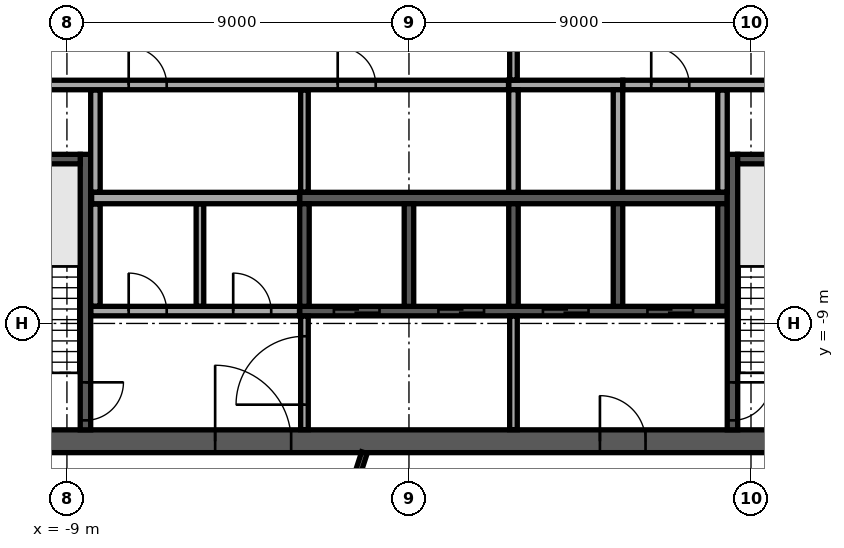
"""IFC4 building model, lengths in metres.
Left out: names, types, materials, properties, quantities, classifications, styles, units other than length and angle.
Written with IfcOpenShell. Run it as: python <this file> out.ifc"""

import sys

from ifc_helpers import new_model, si_unit, direction, frame, frame_2d, origin, place, context, subcontext, project, spatial, rectangle, extrude, element, fill, save


model = new_model("IFC4")
c1 = context("Model", 3, precision=1e-05, world=origin(), true_north=direction((0.0, 1.0)))
c2 = subcontext(c1, "Body", "Model", "MODEL_VIEW")
j1 = project(units=[si_unit("LENGTHUNIT", "METRE"), si_unit("PLANEANGLEUNIT", "RADIAN")], contexts=[c1])
p1 = place(None, origin())
s1 = spatial("IfcSite", under=j1, at=p1, CompositionType="ELEMENT")
p2 = place(p1, origin())
s2 = spatial("IfcBuilding", under=s1, at=p2, CompositionType="ELEMENT")
p3 = place(p2, frame((0.0, 0.0, 316.5)))
s3 = spatial("IfcBuildingStorey", under=s2, at=p3, CompositionType="ELEMENT", Elevation=316.5)
p4 = place(p3, frame((-12.4, -12.1, 0.0), z_axis=(0.0, 0.0, 1.0), x_axis=(1.0, 0.0, 0.0)))
e1 = element("IfcWall", 1, at=p4, inside=s3, PredefinedType="SHEAR", context=c2, shape_type="SweptSolid", body=[
    extrude(rectangle(XDim=24.8, YDim=0.6, at=frame_2d((12.4, 0.0))), origin(), (0.0, 0.0, 1.0), 3.65),
])
p5 = place(p4, frame((7.3, 0.0, 0.0)))
e2 = element("IfcOpeningElement", 2, at=p5, cuts=e1, PredefinedType="OPENING", context=c2, shape_type="SweptSolid", body=[
    extrude(rectangle(XDim=2.0, YDim=2.1, at=frame_2d((1.0, 1.05))), frame((0.0, 0.31, 0.0), z_axis=(0.0, -1.0, 0.0), x_axis=(1.0, 0.0, 0.0)), (0.0, 0.0, 1.0), 0.62),
])
p6 = place(p4, frame((17.425, 0.0, 0.0)))
e3 = element("IfcOpeningElement", 3, at=p6, cuts=e1, PredefinedType="OPENING", context=c2, shape_type="SweptSolid", body=[
    extrude(rectangle(XDim=1.2, YDim=2.1, at=frame_2d((0.6, 1.05))), frame((0.0, 0.31, 0.0), z_axis=(0.0, -1.0, 0.0), x_axis=(1.0, 0.0, 0.0)), (0.0, 0.0, 1.0), 0.62),
])
p7 = place(p4, frame((1.575, 0.0, 0.0)))
e4 = element("IfcOpeningElement", 4, at=p7, cuts=e1, PredefinedType="OPENING", context=c2, shape_type="SweptSolid", body=[
    extrude(rectangle(XDim=1.2, YDim=2.1, at=frame_2d((0.6, 1.05))), frame((0.0, 0.31, 0.0), z_axis=(0.0, -1.0, 0.0), x_axis=(1.0, 0.0, 0.0)), (0.0, 0.0, 1.0), 0.62),
])
p8 = place(p4, frame((22.025, 0.0, 0.0)))
e5 = element("IfcOpeningElement", 5, at=p8, cuts=e1, PredefinedType="OPENING", context=c2, shape_type="SweptSolid", body=[
    extrude(rectangle(XDim=1.2, YDim=2.1, at=frame_2d((0.6, 1.05))), frame((0.0, 0.31, 0.0), z_axis=(0.0, -1.0, 0.0), x_axis=(1.0, 0.0, 0.0)), (0.0, 0.0, 1.0), 0.62),
])
p9 = place(p3, frame((-2.875, -5.7, 0.0), z_axis=(0.0, 0.0, 1.0), x_axis=(1.0, 0.0, 0.0)))
e6 = element("IfcWall", 6, at=p9, inside=s3, PredefinedType="SOLIDWALL", context=c2, shape_type="SweptSolid", body=[
    extrude(rectangle(XDim=11.25, YDim=0.3, at=frame_2d((5.625, 0.0))), origin(), (0.0, 0.0, 1.0), 3.65),
])
p10 = place(p3, frame((2.625, -2.725, 0.0), z_axis=(0.0, 0.0, 1.0), x_axis=(1.0, 0.0, 0.0)))
e7 = element("IfcWall", 7, at=p10, inside=s3, PredefinedType="SOLIDWALL", context=c2, shape_type="SweptSolid", body=[
    extrude(rectangle(XDim=3.0, YDim=0.25, at=frame_2d((1.5, 0.0))), origin(), (0.0, 0.0, 1.0), 3.65),
])
for number, where, z_axis, x_axis in (
    (8, (2.75, -5.55, 0.0), (0.0, 0.0, 1.0), (0.0, 1.0, 0.0)),
    (9, (5.5, -5.55, 0.0), (0.0, 0.0, 1.0), (0.0, 1.0, 0.0)),
):
    element("IfcWall", number, at=place(p3, frame(where, z_axis=z_axis, x_axis=x_axis)), inside=s3, PredefinedType="SOLIDWALL", context=c2, shape_type="SweptSolid", body=[
        extrude(rectangle(XDim=2.7, YDim=0.25, at=frame_2d((1.35, 0.0))), origin(), (0.0, 0.0, 1.0), 3.65),
    ])
p11 = place(p3, frame((-2.875, -8.675, 0.0), z_axis=(0.0, 0.0, 1.0), x_axis=(1.0, 0.0, 0.0)))
e10 = element("IfcWall", 10, at=p11, inside=s3, PredefinedType="SOLIDWALL", context=c2, shape_type="SweptSolid", body=[
    extrude(rectangle(XDim=11.25, YDim=0.25, at=frame_2d((5.625, 0.0))), origin(), (0.0, 0.0, 1.0), 3.65),
])
p12 = place(p11, frame((0.9, 0.0, 0.0)))
e11 = element("IfcOpeningElement", 11, at=p12, cuts=e10, PredefinedType="OPENING", context=c2, shape_type="SweptSolid", body=[
    extrude(rectangle(XDim=1.2, YDim=2.1, at=frame_2d((0.6, 1.05))), frame((0.0, 0.135, 0.0), z_axis=(0.0, -1.0, 0.0), x_axis=(1.0, 0.0, 0.0)), (0.0, 0.0, 1.0), 0.27),
])
p13 = place(p11, frame((3.65, 0.0, 0.0)))
e12 = element("IfcOpeningElement", 12, at=p13, cuts=e10, PredefinedType="OPENING", context=c2, shape_type="SweptSolid", body=[
    extrude(rectangle(XDim=1.2, YDim=2.1, at=frame_2d((0.6, 1.05))), frame((0.0, 0.135, 0.0), z_axis=(0.0, -1.0, 0.0), x_axis=(1.0, 0.0, 0.0)), (0.0, 0.0, 1.0), 0.27),
])
p14 = place(p11, frame((6.4, 0.0, 0.0)))
e13 = element("IfcOpeningElement", 13, at=p14, cuts=e10, PredefinedType="OPENING", context=c2, shape_type="SweptSolid", body=[
    extrude(rectangle(XDim=1.2, YDim=2.1, at=frame_2d((0.6, 1.05))), frame((0.0, 0.135, 0.0), z_axis=(0.0, -1.0, 0.0), x_axis=(1.0, 0.0, 0.0)), (0.0, 0.0, 1.0), 0.27),
])
p15 = place(p11, frame((9.15, 0.0, 0.0)))
e14 = element("IfcOpeningElement", 14, at=p15, cuts=e10, PredefinedType="OPENING", context=c2, shape_type="SweptSolid", body=[
    extrude(rectangle(XDim=1.2, YDim=2.1, at=frame_2d((0.6, 1.05))), frame((0.0, 0.135, 0.0), z_axis=(0.0, -1.0, 0.0), x_axis=(1.0, 0.0, 0.0)), (0.0, 0.0, 1.0), 0.27),
])
for number, where, z_axis, x_axis in (
    (15, (-2.75, -8.55, 0.0), (0.0, 0.0, 1.0), (0.0, 1.0, 0.0)),
    (16, (0.0, -8.55, 0.0), (0.0, 0.0, 1.0), (0.0, 1.0, 0.0)),
    (17, (2.75, -8.55, 0.0), (0.0, 0.0, 1.0), (0.0, 1.0, 0.0)),
    (18, (5.5, -8.55, 0.0), (0.0, 0.0, 1.0), (0.0, 1.0, 0.0)),
    (19, (8.25, -8.55, 0.0), (0.0, 0.0, 1.0), (0.0, 1.0, 0.0)),
):
    element("IfcWall", number, at=place(p3, frame(where, z_axis=z_axis, x_axis=x_axis)), inside=s3, PredefinedType="SOLIDWALL", context=c2, shape_type="SweptSolid", body=[
        extrude(rectangle(XDim=2.7, YDim=0.25, at=frame_2d((1.35, 0.0))), origin(), (0.0, 0.0, 1.0), 3.65),
    ])
p16 = place(p3, frame((-8.512, -4.55, 0.0), z_axis=(0.0, 0.0, 1.0), x_axis=(0.0, -1.0, 0.0)))
e20 = element("IfcWall", 20, at=p16, inside=s3, PredefinedType="SOLIDWALL", context=c2, shape_type="SweptSolid", body=[
    extrude(rectangle(XDim=7.25, YDim=0.275, at=frame_2d((3.625, 0.0))), origin(), (0.0, 0.0, 1.0), 3.65),
])
p17 = place(p16, frame((6.0, 0.0, 0.0)))
e21 = element("IfcOpeningElement", 21, at=p17, cuts=e20, PredefinedType="OPENING", context=c2, shape_type="SweptSolid", body=[
    extrude(rectangle(XDim=1.0, YDim=2.1, at=frame_2d((0.5, 1.05))), frame((0.0, 0.147, 0.0), z_axis=(0.0, -1.0, 0.0), x_axis=(1.0, 0.0, 0.0)), (0.0, 0.0, 1.0), 0.295),
])
p18 = place(p3, frame((-8.65, -4.675, 0.0), z_axis=(0.0, 0.0, 1.0), x_axis=(-1.0, 0.0, 0.0)))
e22 = element("IfcWall", 22, at=p18, inside=s3, PredefinedType="SOLIDWALL", context=c2, shape_type="SweptSolid", body=[
    extrude(rectangle(XDim=3.15, YDim=0.25, at=frame_2d((1.575, 0.0))), origin(), (0.0, 0.0, 1.0), 3.65),
])
p19 = place(p3, frame((8.512, -4.55, 0.0), z_axis=(0.0, 0.0, 1.0), x_axis=(0.0, -1.0, 0.0)))
e23 = element("IfcWall", 23, at=p19, inside=s3, PredefinedType="SOLIDWALL", context=c2, shape_type="SweptSolid", body=[
    extrude(rectangle(XDim=7.25, YDim=0.275, at=frame_2d((3.625, 0.0))), origin(), (0.0, 0.0, 1.0), 3.65),
])
p20 = place(p19, frame((6.0, 0.0, 0.0)))
e24 = element("IfcOpeningElement", 24, at=p20, cuts=e23, PredefinedType="OPENING", context=c2, shape_type="SweptSolid", body=[
    extrude(rectangle(XDim=1.0, YDim=2.1, at=frame_2d((0.5, 1.05))), frame((0.0, 0.147, 0.0), z_axis=(0.0, -1.0, 0.0), x_axis=(1.0, 0.0, 0.0)), (0.0, 0.0, 1.0), 0.295),
])
p21 = place(p3, frame((8.65, -4.675, 0.0), z_axis=(0.0, 0.0, 1.0), x_axis=(1.0, 0.0, 0.0)))
e25 = element("IfcWall", 25, at=p21, inside=s3, PredefinedType="SOLIDWALL", context=c2, shape_type="SweptSolid", body=[
    extrude(rectangle(XDim=3.15, YDim=0.25, at=frame_2d((1.575, 0.0))), origin(), (0.0, 0.0, 1.0), 3.65),
])
p22 = place(p3, frame((-2.75, -11.795, 0.0), z_axis=(0.0, 0.0, 1.0), x_axis=(0.0, 1.0, 0.0)))
e26 = element("IfcWall", 26, at=p22, inside=s3, PredefinedType="PARTITIONING", context=c2, shape_type="SweptSolid", body=[
    extrude(rectangle(XDim=2.99, YDim=0.2, at=frame_2d((1.495, 0.0))), origin(), (0.0, 0.0, 1.0), 3.65),
])
p23 = place(p22, frame((0.657, 0.0, 0.0)))
e27 = element("IfcOpeningElement", 27, at=p23, cuts=e26, PredefinedType="OPENING", context=c2, shape_type="SweptSolid", body=[
    extrude(rectangle(XDim=1.8, YDim=2.1, at=frame_2d((0.9, 1.05))), frame((0.0, 0.11, 0.0), z_axis=(0.0, -1.0, 0.0), x_axis=(1.0, 0.0, 0.0)), (0.0, 0.0, 1.0), 0.22),
])
p24 = place(p3, frame((2.75, -11.795, 0.0), z_axis=(0.0, 0.0, 1.0), x_axis=(0.0, 1.0, 0.0)))
e28 = element("IfcWall", 28, at=p24, inside=s3, PredefinedType="PARTITIONING", context=c2, shape_type="SweptSolid", body=[
    extrude(rectangle(XDim=2.99, YDim=0.2, at=frame_2d((1.495, 0.0))), origin(), (0.0, 0.0, 1.0), 3.65),
])
p25 = place(p3, frame((-8.37, -8.675, 0.0), z_axis=(0.0, 0.0, 1.0), x_axis=(1.0, 0.0, 0.0)))
e29 = element("IfcWall", 29, at=p25, inside=s3, PredefinedType="PARTITIONING", context=c2, shape_type="SweptSolid", body=[
    extrude(rectangle(XDim=5.49, YDim=0.25, at=frame_2d((2.745, 0.0))), origin(), (0.0, 0.0, 1.0), 3.65),
])
p26 = place(p25, frame((0.995, 0.0, 0.0)))
e30 = element("IfcOpeningElement", 30, at=p26, cuts=e29, PredefinedType="OPENING", context=c2, shape_type="SweptSolid", body=[
    extrude(rectangle(XDim=1.0, YDim=2.1, at=frame_2d((0.5, 1.05))), frame((0.0, 0.135, 0.0), z_axis=(0.0, -1.0, 0.0), x_axis=(1.0, 0.0, 0.0)), (0.0, 0.0, 1.0), 0.27),
])
p27 = place(p25, frame((3.745, 0.0, 0.0)))
e31 = element("IfcOpeningElement", 31, at=p27, cuts=e29, PredefinedType="OPENING", context=c2, shape_type="SweptSolid", body=[
    extrude(rectangle(XDim=1.0, YDim=2.1, at=frame_2d((0.5, 1.05))), frame((0.0, 0.135, 0.0), z_axis=(0.0, -1.0, 0.0), x_axis=(1.0, 0.0, 0.0)), (0.0, 0.0, 1.0), 0.27),
])
p28 = place(p3, frame((-8.25, -8.545, 0.0), z_axis=(0.0, 0.0, 1.0), x_axis=(0.0, 1.0, 0.0)))
e32 = element("IfcWall", 32, at=p28, inside=s3, PredefinedType="PARTITIONING", context=c2, shape_type="SweptSolid", body=[
    extrude(rectangle(XDim=2.69, YDim=0.25, at=frame_2d((1.345, 0.0))), origin(), (0.0, 0.0, 1.0), 3.65),
])
p29 = place(p3, frame((-5.5, -8.545, 0.0), z_axis=(0.0, 0.0, 1.0), x_axis=(0.0, 1.0, 0.0)))
e33 = element("IfcWall", 33, at=p29, inside=s3, PredefinedType="PARTITIONING", context=c2, shape_type="SweptSolid", body=[
    extrude(rectangle(XDim=2.69, YDim=0.2, at=frame_2d((1.345, 0.0))), origin(), (0.0, 0.0, 1.0), 3.65),
])
p30 = place(p3, frame((-8.35, -5.7, 0.0), z_axis=(0.0, 0.0, 1.0), x_axis=(1.0, 0.0, 0.0)))
e34 = element("IfcWall", 34, at=p30, inside=s3, PredefinedType="PARTITIONING", context=c2, shape_type="SweptSolid", body=[
    extrude(rectangle(XDim=5.47, YDim=0.3, at=frame_2d((2.735, 0.0))), origin(), (0.0, 0.0, 1.0), 3.65),
])
p31 = place(p3, frame((-8.25, -5.545, 0.0), z_axis=(0.0, 0.0, 1.0), x_axis=(0.0, 1.0, 0.0)))
e35 = element("IfcWall", 35, at=p31, inside=s3, PredefinedType="PARTITIONING", context=c2, shape_type="SweptSolid", body=[
    extrude(rectangle(XDim=2.69, YDim=0.25, at=frame_2d((1.345, 0.0))), origin(), (0.0, 0.0, 1.0), 3.65),
])
p32 = place(p3, frame((-2.75, -5.545, 0.0), z_axis=(0.0, 0.0, 1.0), x_axis=(0.0, 1.0, 0.0)))
e36 = element("IfcWall", 36, at=p32, inside=s3, PredefinedType="PARTITIONING", context=c2, shape_type="SweptSolid", body=[
    extrude(rectangle(XDim=2.69, YDim=0.2, at=frame_2d((1.345, 0.0))), origin(), (0.0, 0.0, 1.0), 3.65),
])
p33 = place(p3, frame((8.25, -5.545, 0.0), z_axis=(0.0, 0.0, 1.0), x_axis=(0.0, 1.0, 0.0)))
e37 = element("IfcWall", 37, at=p33, inside=s3, PredefinedType="PARTITIONING", context=c2, shape_type="SweptSolid", body=[
    extrude(rectangle(XDim=2.69, YDim=0.25, at=frame_2d((1.345, 0.0))), origin(), (0.0, 0.0, 1.0), 3.65),
])
p34 = place(p3, frame((-11.795, -2.725, 0.0), z_axis=(0.0, 0.0, 1.0), x_axis=(1.0, 0.0, 0.0)))
e38 = element("IfcWall", 38, at=p34, inside=s3, PredefinedType="PARTITIONING", context=c2, shape_type="SweptSolid", body=[
    extrude(rectangle(XDim=14.415, YDim=0.25, at=frame_2d((7.208, 0.0))), origin(), (0.0, 0.0, 1.0), 3.65),
])
p35 = place(p34, frame((1.295, 0.0, 0.0)))
e39 = element("IfcOpeningElement", 39, at=p35, cuts=e38, PredefinedType="OPENING", context=c2, shape_type="SweptSolid", body=[
    extrude(rectangle(XDim=1.0, YDim=2.1, at=frame_2d((0.5, 1.05))), frame((0.0, 0.135, 0.0), z_axis=(0.0, -1.0, 0.0), x_axis=(1.0, 0.0, 0.0)), (0.0, 0.0, 1.0), 0.27),
])
p36 = place(p34, frame((4.42, 0.0, 0.0)))
e40 = element("IfcOpeningElement", 40, at=p36, cuts=e38, PredefinedType="OPENING", context=c2, shape_type="SweptSolid", body=[
    extrude(rectangle(XDim=1.0, YDim=2.1, at=frame_2d((0.5, 1.05))), frame((0.0, 0.135, 0.0), z_axis=(0.0, -1.0, 0.0), x_axis=(1.0, 0.0, 0.0)), (0.0, 0.0, 1.0), 0.27),
])
p37 = place(p34, frame((9.92, 0.0, 0.0)))
e41 = element("IfcOpeningElement", 41, at=p37, cuts=e38, PredefinedType="OPENING", context=c2, shape_type="SweptSolid", body=[
    extrude(rectangle(XDim=1.0, YDim=2.1, at=frame_2d((0.5, 1.05))), frame((0.0, 0.135, 0.0), z_axis=(0.0, -1.0, 0.0), x_axis=(1.0, 0.0, 0.0)), (0.0, 0.0, 1.0), 0.27),
])
p38 = place(p3, frame((5.63, -2.725, 0.0), z_axis=(0.0, 0.0, 1.0), x_axis=(1.0, 0.0, 0.0)))
e42 = element("IfcWall", 42, at=p38, inside=s3, PredefinedType="PARTITIONING", context=c2, shape_type="SweptSolid", body=[
    extrude(rectangle(XDim=6.165, YDim=0.25, at=frame_2d((3.083, 0.0))), origin(), (0.0, 0.0, 1.0), 3.65),
])
p39 = place(p38, frame((0.745, 0.0, 0.0)))
e43 = element("IfcOpeningElement", 43, at=p39, cuts=e42, PredefinedType="OPENING", context=c2, shape_type="SweptSolid", body=[
    extrude(rectangle(XDim=1.0, YDim=2.1, at=frame_2d((0.5, 1.05))), frame((0.0, 0.135, 0.0), z_axis=(0.0, -1.0, 0.0), x_axis=(1.0, 0.0, 0.0)), (0.0, 0.0, 1.0), 0.27),
])
p40 = place(p38, frame((3.92, 0.0, 0.0)))
e44 = element("IfcOpeningElement", 44, at=p40, cuts=e42, PredefinedType="OPENING", context=c2, shape_type="SweptSolid", body=[
    extrude(rectangle(XDim=0.9, YDim=2.1, at=frame_2d((0.45, 1.05))), frame((0.0, 0.135, 0.0), z_axis=(0.0, -1.0, 0.0), x_axis=(1.0, 0.0, 0.0)), (0.0, 0.0, 1.0), 0.27),
])
p41 = place(p3, frame((2.75, -2.595, 0.0), z_axis=(0.0, 0.0, 1.0), x_axis=(0.0, 1.0, 0.0)))
e45 = element("IfcWall", 45, at=p41, inside=s3, PredefinedType="PARTITIONING", context=c2, shape_type="SweptSolid", body=[
    extrude(rectangle(XDim=5.19, YDim=0.2, at=frame_2d((2.595, 0.0))), origin(), (0.0, 0.0, 1.0), 3.65),
])
p42 = place(p41, frame((1.395, 0.0, 0.0)))
e46 = element("IfcOpeningElement", 46, at=p42, cuts=e45, PredefinedType="OPENING", context=c2, shape_type="SweptSolid", body=[
    extrude(rectangle(XDim=2.4, YDim=2.4, at=frame_2d((1.2, 1.2))), frame((0.0, 0.11, 0.0), z_axis=(0.0, -1.0, 0.0), x_axis=(1.0, 0.0, 0.0)), (0.0, 0.0, 1.0), 0.22),
])
p43 = place(p3, frame((-22.763, -12.676, 0.0), z_axis=(0.0, 0.0, 1.0), x_axis=(0.951055018443, -0.309021604252, 0.0)))
e47 = element("IfcWall", 47, at=p43, inside=s3, PredefinedType="PARTITIONING", context=c2, shape_type="SweptSolid", body=[
    extrude(rectangle(XDim=35.537, YDim=0.15, at=frame_2d((17.769, 0.0))), origin(), (0.0, 0.0, 1.0), 3.25),
])
p44 = place(p43, frame((0.8, 0.0, 0.0)))
e48 = element("IfcOpeningElement", 48, at=p44, cuts=e47, PredefinedType="OPENING", context=c2, shape_type="SweptSolid", body=[
    extrude(rectangle(XDim=1.8, YDim=2.1, at=frame_2d((0.9, 1.05))), frame((0.0, 0.085, 0.0), z_axis=(0.0, -1.0, 0.0), x_axis=(1.0, 0.0, 0.0)), (0.0, 0.0, 1.0), 0.17),
])
p45 = place(p43, frame((9.098, 0.0, 0.0)))
e49 = element("IfcOpeningElement", 49, at=p45, cuts=e47, PredefinedType="OPENING", context=c2, shape_type="SweptSolid", body=[
    extrude(rectangle(XDim=1.0, YDim=2.1, at=frame_2d((0.5, 1.05))), frame((0.0, 0.085, 0.0), z_axis=(0.0, -1.0, 0.0), x_axis=(1.0, 0.0, 0.0)), (0.0, 0.0, 1.0), 0.17),
])
p46 = place(p43, frame((17.589, 0.0, 0.0)))
e50 = element("IfcOpeningElement", 50, at=p46, cuts=e47, PredefinedType="OPENING", context=c2, shape_type="SweptSolid", body=[
    extrude(rectangle(XDim=1.0, YDim=2.1, at=frame_2d((0.5, 1.05))), frame((0.0, 0.085, 0.0), z_axis=(0.0, -1.0, 0.0), x_axis=(1.0, 0.0, 0.0)), (0.0, 0.0, 1.0), 0.17),
])
p47 = place(p43, frame((27.473, 0.0, 0.0)))
e51 = element("IfcOpeningElement", 51, at=p47, cuts=e47, PredefinedType="OPENING", context=c2, shape_type="SweptSolid", body=[
    extrude(rectangle(XDim=1.0, YDim=2.1, at=frame_2d((0.5, 1.05))), frame((0.0, 0.085, 0.0), z_axis=(0.0, -1.0, 0.0), x_axis=(1.0, 0.0, 0.0)), (0.0, 0.0, 1.0), 0.17),
])
p48 = place(p43, frame((30.83, 0.0, 0.0)))
e52 = element("IfcOpeningElement", 52, at=p48, cuts=e47, PredefinedType="OPENING", context=c2, shape_type="SweptSolid", body=[
    extrude(rectangle(XDim=1.8, YDim=2.1, at=frame_2d((0.9, 1.05))), frame((0.0, 0.085, 0.0), z_axis=(0.0, -1.0, 0.0), x_axis=(1.0, 0.0, 0.0)), (0.0, 0.0, 1.0), 0.17),
])
p49 = place(p3, frame((-2.551, -16.641, 0.0), z_axis=(0.0, 0.0, 1.0), x_axis=(0.309172730038, 0.951005900613, 0.0)))
e53 = element("IfcWall", 53, at=p49, inside=s3, PredefinedType="PARTITIONING", context=c2, shape_type="SweptSolid", body=[
    extrude(rectangle(XDim=4.459, YDim=0.15, at=frame_2d((2.229, 0.0))), origin(), (0.0, 0.0, 1.0), 3.25),
])
p50 = place(p49, frame((1.8, 0.0, 0.0)))
e54 = element("IfcOpeningElement", 54, at=p50, cuts=e53, PredefinedType="OPENING", context=c2, shape_type="SweptSolid", body=[
    extrude(rectangle(XDim=1.0, YDim=2.1, at=frame_2d((0.5, 1.05))), frame((0.0, 0.085, 0.0), z_axis=(0.0, -1.0, 0.0), x_axis=(1.0, 0.0, 0.0)), (0.0, 0.0, 1.0), 0.17),
])
p51 = place(p5, origin())
e55 = element("IfcDoor", 55, at=p51, inside=s3, OperationType="SINGLE_SWING_LEFT", PredefinedType="DOOR", context=c2, shape_type="SweptSolid", body=[
    extrude(rectangle(XDim=2.0, YDim=2.1, at=frame_2d((1.0, 1.05))), frame((0.0, 0.025, 0.0), z_axis=(0.0, -1.0, 0.0), x_axis=(1.0, 0.0, 0.0)), (0.0, 0.0, 1.0), 0.05),
])
fill(e2, e55)
p52 = place(p6, origin())
e56 = element("IfcDoor", 56, at=p52, inside=s3, OperationType="SINGLE_SWING_LEFT", PredefinedType="DOOR", context=c2, shape_type="SweptSolid", body=[
    extrude(rectangle(XDim=1.2, YDim=2.1, at=frame_2d((0.6, 1.05))), frame((0.0, 0.025, 0.0), z_axis=(0.0, -1.0, 0.0), x_axis=(1.0, 0.0, 0.0)), (0.0, 0.0, 1.0), 0.05),
])
fill(e3, e56)
p53 = place(p12, origin())
e57 = element("IfcDoor", 57, at=p53, inside=s3, OperationType="DOUBLE_DOOR_SLIDING", PredefinedType="DOOR", context=c2, shape_type="SweptSolid", body=[
    extrude(rectangle(XDim=1.2, YDim=2.1, at=frame_2d((0.6, 1.05))), frame((0.0, 0.025, 0.0), z_axis=(0.0, -1.0, 0.0), x_axis=(1.0, 0.0, 0.0)), (0.0, 0.0, 1.0), 0.05),
])
fill(e11, e57)
p54 = place(p13, origin())
e58 = element("IfcDoor", 58, at=p54, inside=s3, OperationType="DOUBLE_DOOR_SLIDING", PredefinedType="DOOR", context=c2, shape_type="SweptSolid", body=[
    extrude(rectangle(XDim=1.2, YDim=2.1, at=frame_2d((0.6, 1.05))), frame((0.0, 0.025, 0.0), z_axis=(0.0, -1.0, 0.0), x_axis=(1.0, 0.0, 0.0)), (0.0, 0.0, 1.0), 0.05),
])
fill(e12, e58)
p55 = place(p14, origin())
e59 = element("IfcDoor", 59, at=p55, inside=s3, OperationType="DOUBLE_DOOR_SLIDING", PredefinedType="DOOR", context=c2, shape_type="SweptSolid", body=[
    extrude(rectangle(XDim=1.2, YDim=2.1, at=frame_2d((0.6, 1.05))), frame((0.0, 0.025, 0.0), z_axis=(0.0, -1.0, 0.0), x_axis=(1.0, 0.0, 0.0)), (0.0, 0.0, 1.0), 0.05),
])
fill(e13, e59)
p56 = place(p15, origin())
e60 = element("IfcDoor", 60, at=p56, inside=s3, OperationType="DOUBLE_DOOR_SLIDING", PredefinedType="DOOR", context=c2, shape_type="SweptSolid", body=[
    extrude(rectangle(XDim=1.2, YDim=2.1, at=frame_2d((0.6, 1.05))), frame((0.0, 0.025, 0.0), z_axis=(0.0, -1.0, 0.0), x_axis=(1.0, 0.0, 0.0)), (0.0, 0.0, 1.0), 0.05),
])
fill(e14, e60)
p57 = place(p17, origin())
e61 = element("IfcDoor", 61, at=p57, inside=s3, OperationType="SINGLE_SWING_LEFT", PredefinedType="DOOR", context=c2, shape_type="SweptSolid", body=[
    extrude(rectangle(XDim=1.0, YDim=2.1, at=frame_2d((0.5, 1.05))), frame((0.0, 0.025, 0.0), z_axis=(0.0, -1.0, 0.0), x_axis=(1.0, 0.0, 0.0)), (0.0, 0.0, 1.0), 0.05),
])
fill(e21, e61)
p58 = place(p20, origin())
e62 = element("IfcDoor", 62, at=p58, inside=s3, OperationType="SINGLE_SWING_LEFT", PredefinedType="DOOR", context=c2, shape_type="SweptSolid", body=[
    extrude(rectangle(XDim=1.0, YDim=2.1, at=frame_2d((0.5, 1.05))), frame((0.0, 0.025, 0.0), z_axis=(0.0, -1.0, 0.0), x_axis=(1.0, 0.0, 0.0)), (0.0, 0.0, 1.0), 0.05),
])
fill(e24, e62)
p59 = place(p26, origin())
e63 = element("IfcDoor", 63, at=p59, inside=s3, OperationType="SINGLE_SWING_RIGHT", PredefinedType="DOOR", context=c2, shape_type="SweptSolid", body=[
    extrude(rectangle(XDim=1.0, YDim=2.1, at=frame_2d((0.5, 1.05))), frame((0.0, 0.025, 0.0), z_axis=(0.0, -1.0, 0.0), x_axis=(1.0, 0.0, 0.0)), (0.0, 0.0, 1.0), 0.05),
])
fill(e30, e63)
p60 = place(p27, origin())
e64 = element("IfcDoor", 64, at=p60, inside=s3, OperationType="SINGLE_SWING_RIGHT", PredefinedType="DOOR", context=c2, shape_type="SweptSolid", body=[
    extrude(rectangle(XDim=1.0, YDim=2.1, at=frame_2d((0.5, 1.05))), frame((0.0, 0.025, 0.0), z_axis=(0.0, -1.0, 0.0), x_axis=(1.0, 0.0, 0.0)), (0.0, 0.0, 1.0), 0.05),
])
fill(e31, e64)
p61 = place(p39, origin())
e65 = element("IfcDoor", 65, at=p61, inside=s3, OperationType="SINGLE_SWING_RIGHT", PredefinedType="DOOR", context=c2, shape_type="SweptSolid", body=[
    extrude(rectangle(XDim=1.0, YDim=2.1, at=frame_2d((0.5, 1.05))), frame((0.0, 0.025, 0.0), z_axis=(0.0, -1.0, 0.0), x_axis=(1.0, 0.0, 0.0)), (0.0, 0.0, 1.0), 0.05),
])
fill(e43, e65)
p62 = place(p36, origin())
e66 = element("IfcDoor", 66, at=p62, inside=s3, OperationType="SINGLE_SWING_RIGHT", PredefinedType="DOOR", context=c2, shape_type="SweptSolid", body=[
    extrude(rectangle(XDim=1.0, YDim=2.1, at=frame_2d((0.5, 1.05))), frame((0.0, 0.025, 0.0), z_axis=(0.0, -1.0, 0.0), x_axis=(1.0, 0.0, 0.0)), (0.0, 0.0, 1.0), 0.05),
])
fill(e40, e66)
p63 = place(p37, origin())
e67 = element("IfcDoor", 67, at=p63, inside=s3, OperationType="SINGLE_SWING_RIGHT", PredefinedType="DOOR", context=c2, shape_type="SweptSolid", body=[
    extrude(rectangle(XDim=1.0, YDim=2.1, at=frame_2d((0.5, 1.05))), frame((0.0, 0.025, 0.0), z_axis=(0.0, -1.0, 0.0), x_axis=(1.0, 0.0, 0.0)), (0.0, 0.0, 1.0), 0.05),
])
fill(e41, e67)
p64 = place(p23, origin())
e68 = element("IfcDoor", 68, at=p64, inside=s3, OperationType="SINGLE_SWING_LEFT", PredefinedType="DOOR", context=c2, shape_type="SweptSolid", body=[
    extrude(rectangle(XDim=1.8, YDim=2.1, at=frame_2d((0.9, 1.05))), frame((0.0, 0.025, 0.0), z_axis=(0.0, -1.0, 0.0), x_axis=(1.0, 0.0, 0.0)), (0.0, 0.0, 1.0), 0.05),
])
fill(e27, e68)
save(model, sys.argv[1])
